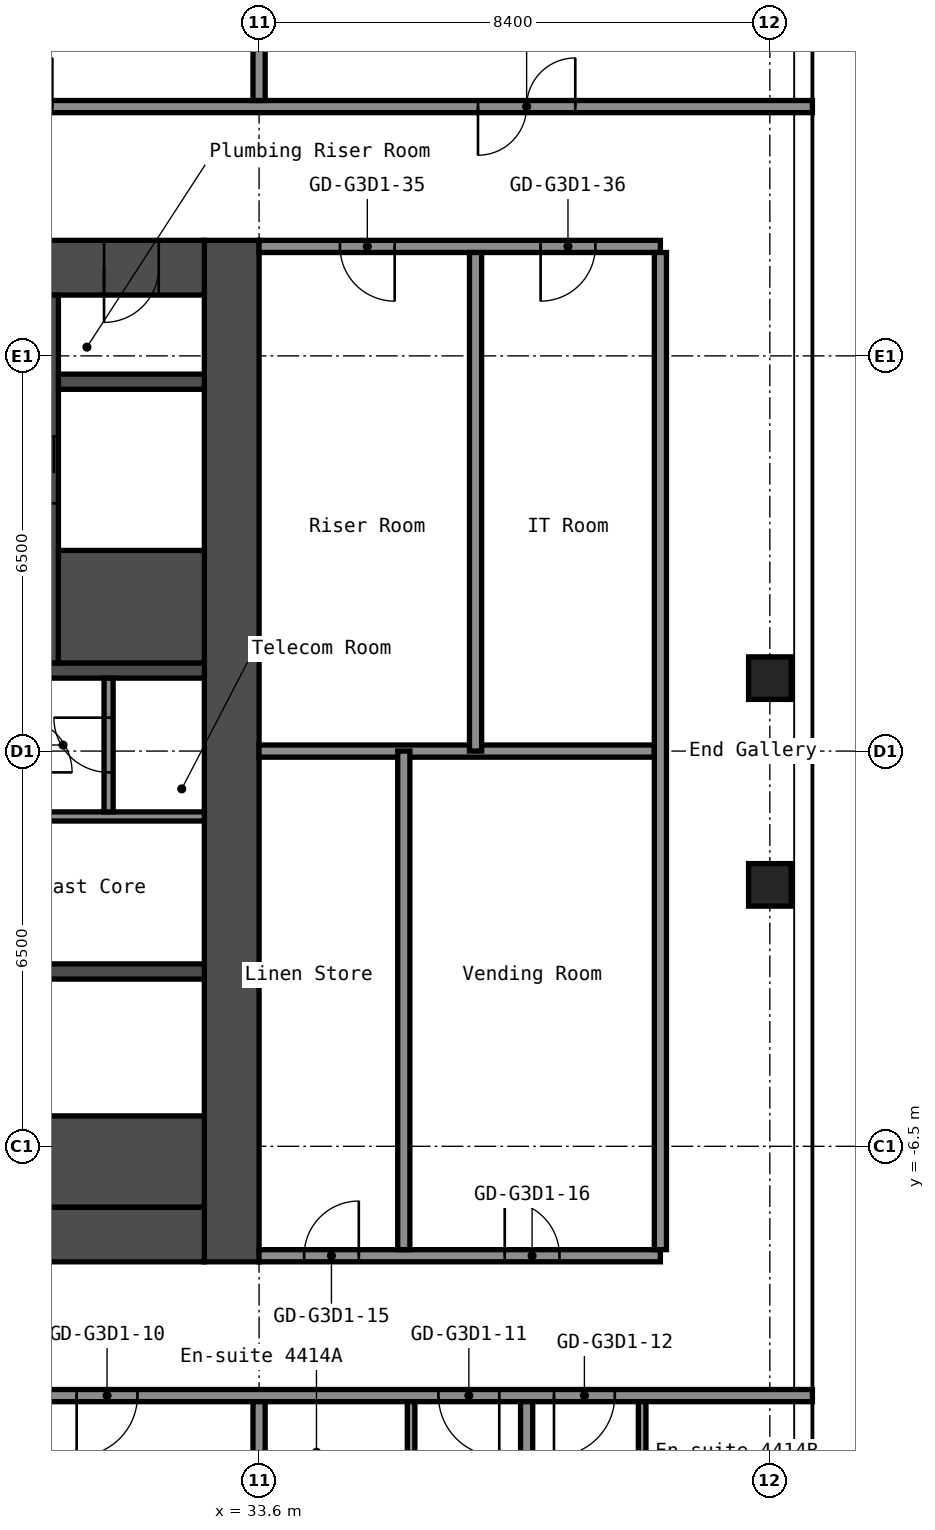
"""IFC4 building model, lengths in metres.
Left out: names, types, materials, properties, quantities, classifications, styles, units other than length and angle.
Written with IfcOpenShell. Run it as: python <this file> out.ifc"""

import sys

from ifc_helpers import new_model, si_unit, direction, frame, frame_2d, origin, origin_2d, place, context, subcontext, project, spatial, rectangle, hollow_rectangle, extrude, element, fill, save


model = new_model("IFC4")
c1 = context("Model", 3, precision=1e-05, world=origin(), true_north=direction((0.0, 1.0)))
c2 = subcontext(c1, "Body", "Model", "MODEL_VIEW")
j1 = project(units=[si_unit("LENGTHUNIT", "METRE"), si_unit("PLANEANGLEUNIT", "RADIAN")], contexts=[c1])
p1 = place(None, origin())
s1 = spatial("IfcSite", under=j1, at=p1, CompositionType="ELEMENT")
p2 = place(p1, origin())
s2 = spatial("IfcBuilding", under=s1, at=p2, CompositionType="ELEMENT")
p3 = place(p2, frame((0.0, 0.0, 156.6)))
s3 = spatial("IfcBuildingStorey", under=s2, at=p3, CompositionType="ELEMENT", Elevation=156.6)
for number, where, z_axis, x_axis in (
    (1, (42.0, -2.2, 0.0), (0.0, 0.0, 1.0), (1.0, 0.0, 0.0)),
    (2, (42.0, 1.2, 0.0), (0.0, 0.0, 1.0), (1.0, 0.0, 0.0)),
):
    element("IfcColumn", number, at=place(p3, frame(where, z_axis=z_axis, x_axis=x_axis)), inside=s3, PredefinedType="COLUMN", context=c2, shape_type="SweptSolid", body=[
        extrude(hollow_rectangle(XDim=0.7, YDim=0.7, WallThickness=0.028, at=origin_2d()), origin(), (0.0, 0.0, 1.0), 2.75),
    ])
p4 = place(p3, frame((33.15, -8.4, 0.0), z_axis=(0.0, 0.0, 1.0), x_axis=(0.0, 1.0, 0.0)))
e3 = element("IfcWall", 3, at=p4, inside=s3, PredefinedType="SHEAR", context=c2, shape_type="SweptSolid", body=[
    extrude(rectangle(XDim=16.8, YDim=0.9, at=frame_2d((8.4, 0.0))), origin(), (0.0, 0.0, 1.0), 2.75),
])
p5 = place(p3, frame((17.7, 7.95, 0.0), z_axis=(0.0, 0.0, 1.0), x_axis=(1.0, 0.0, 0.0)))
e4 = element("IfcWall", 4, at=p5, inside=s3, PredefinedType="SHEAR", context=c2, shape_type="SweptSolid", body=[
    extrude(rectangle(XDim=15.0, YDim=0.9, at=frame_2d((7.5, 0.0))), origin(), (0.0, 0.0, 1.0), 2.75),
])
p6 = place(p5, frame((10.4, 0.0, 0.0)))
e5 = element("IfcOpeningElement", 5, at=p6, cuts=e4, PredefinedType="OPENING", context=c2, shape_type="SweptSolid", body=[
    extrude(rectangle(XDim=1.2, YDim=2.1, at=frame_2d((0.6, 1.05))), frame((0.0, 0.46, 0.0), z_axis=(0.0, -1.0, 0.0), x_axis=(1.0, 0.0, 0.0)), (0.0, 0.0, 1.0), 0.92),
])
p7 = place(p5, frame((13.35, 0.0, 0.0)))
e6 = element("IfcOpeningElement", 6, at=p7, cuts=e4, PredefinedType="OPENING", context=c2, shape_type="SweptSolid", body=[
    extrude(rectangle(XDim=0.9, YDim=2.1, at=frame_2d((0.45, 1.05))), frame((0.0, 0.46, 0.0), z_axis=(0.0, -1.0, 0.0), x_axis=(1.0, 0.0, 0.0)), (0.0, 0.0, 1.0), 0.92),
])
p8 = place(p3, frame((17.7, -7.95, 0.0), z_axis=(0.0, 0.0, 1.0), x_axis=(1.0, 0.0, 0.0)))
e7 = element("IfcWall", 7, at=p8, inside=s3, PredefinedType="SHEAR", context=c2, shape_type="SweptSolid", body=[
    extrude(rectangle(XDim=15.0, YDim=0.9, at=frame_2d((7.5, 0.0))), origin(), (0.0, 0.0, 1.0), 2.75),
])
p9 = place(p8, frame((2.55, 0.0, 0.0)))
e8 = element("IfcOpeningElement", 8, at=p9, cuts=e7, PredefinedType="OPENING", context=c2, shape_type="SweptSolid", body=[
    extrude(rectangle(XDim=1.0, YDim=2.1, at=frame_2d((0.5, 1.05))), frame((0.0, 0.46, 0.0), z_axis=(0.0, -1.0, 0.0), x_axis=(1.0, 0.0, 0.0)), (0.0, 0.0, 1.0), 0.92),
])
p10 = place(p3, frame((27.65, 1.325, 0.0), z_axis=(0.0, 0.0, 1.0), x_axis=(1.0, 0.0, 0.0)))
e9 = element("IfcWall", 9, at=p10, inside=s3, PredefinedType="SHEAR", context=c2, shape_type="SweptSolid", body=[
    extrude(rectangle(XDim=5.05, YDim=0.25, at=frame_2d((2.525, 0.0))), origin(), (0.0, 0.0, 1.0), 2.75),
])
p11 = place(p10, frame((0.55, 0.0, 0.0)))
e10 = element("IfcOpeningElement", 10, at=p11, cuts=e9, PredefinedType="OPENING", context=c2, shape_type="SweptSolid", body=[
    extrude(rectangle(XDim=1.2, YDim=2.1, at=frame_2d((0.6, 1.05))), frame((0.0, 0.135, 0.0), z_axis=(0.0, -1.0, 0.0), x_axis=(1.0, 0.0, 0.0)), (0.0, 0.0, 1.0), 0.27),
])
p12 = place(p3, frame((30.175, 1.45, 0.0), z_axis=(0.0, 0.0, 1.0), x_axis=(0.0, 1.0, 0.0)))
e11 = element("IfcWall", 11, at=p12, inside=s3, PredefinedType="SHEAR", context=c2, shape_type="SweptSolid", body=[
    extrude(rectangle(XDim=6.05, YDim=0.25, at=frame_2d((3.025, 0.0))), origin(), (0.0, 0.0, 1.0), 2.75),
])
p13 = place(p12, frame((2.625, 0.0, 0.0)))
e12 = element("IfcOpeningElement", 12, at=p13, cuts=e11, PredefinedType="OPENING", context=c2, shape_type="SweptSolid", body=[
    extrude(rectangle(XDim=1.1, YDim=2.1, at=frame_2d((0.55, 1.05))), frame((0.0, 0.135, 0.0), z_axis=(0.0, -1.0, 0.0), x_axis=(1.0, 0.0, 0.0)), (0.0, 0.0, 1.0), 0.27),
])
p14 = place(p3, frame((30.3, 2.375, 0.0), z_axis=(0.0, 0.0, 1.0), x_axis=(1.0, 0.0, 0.0)))
e13 = element("IfcWall", 13, at=p14, inside=s3, PredefinedType="SHEAR", context=c2, shape_type="SweptSolid", body=[
    extrude(rectangle(XDim=2.4, YDim=1.85, at=frame_2d((1.2, 0.0))), origin(), (0.0, 0.0, 1.0), 2.75),
])
p15 = place(p3, frame((30.3, 6.075, 0.0), z_axis=(0.0, 0.0, 1.0), x_axis=(1.0, 0.0, 0.0)))
e14 = element("IfcWall", 14, at=p15, inside=s3, PredefinedType="SHEAR", context=c2, shape_type="SweptSolid", body=[
    extrude(rectangle(XDim=2.4, YDim=0.25, at=frame_2d((1.2, 0.0))), origin(), (0.0, 0.0, 1.0), 2.75),
])
p16 = place(p3, frame((28.15, -3.625, 0.0), z_axis=(0.0, 0.0, 1.0), x_axis=(1.0, 0.0, 0.0)))
e15 = element("IfcWall", 15, at=p16, inside=s3, PredefinedType="SHEAR", context=c2, shape_type="SweptSolid", body=[
    extrude(rectangle(XDim=4.55, YDim=0.25, at=frame_2d((2.275, 0.0))), origin(), (0.0, 0.0, 1.0), 2.75),
])
p17 = place(p3, frame((28.15, -6.75, 0.0), z_axis=(0.0, 0.0, 1.0), x_axis=(1.0, 0.0, 0.0)))
e16 = element("IfcWall", 16, at=p17, inside=s3, PredefinedType="SHEAR", context=c2, shape_type="SweptSolid", body=[
    extrude(rectangle(XDim=4.55, YDim=1.5, at=frame_2d((2.275, 0.0))), origin(), (0.0, 0.0, 1.0), 2.75),
])
p18 = place(p3, frame((29.7, -1.075, 0.0), z_axis=(0.0, 0.0, 1.0), x_axis=(1.0, 0.0, 0.0)))
e17 = element("IfcWall", 17, at=p18, inside=s3, PredefinedType="PARTITIONING", context=c2, shape_type="SweptSolid", body=[
    extrude(rectangle(XDim=3.0, YDim=0.15, at=frame_2d((1.5, 0.0))), origin(), (0.0, 0.0, 1.0), 2.75),
])
p19 = place(p3, frame((31.125, -1.0, 0.0), z_axis=(0.0, 0.0, 1.0), x_axis=(0.0, 1.0, 0.0)))
e18 = element("IfcWall", 18, at=p19, inside=s3, PredefinedType="PARTITIONING", context=c2, shape_type="SweptSolid", body=[
    extrude(rectangle(XDim=2.2, YDim=0.15, at=frame_2d((1.1, 0.0))), origin(), (0.0, 0.0, 1.0), 2.75),
])
p20 = place(p19, frame((0.65, 0.0, 0.0)))
e19 = element("IfcOpeningElement", 19, at=p20, cuts=e18, PredefinedType="OPENING", context=c2, shape_type="SweptSolid", body=[
    extrude(rectangle(XDim=0.9, YDim=2.1, at=frame_2d((0.45, 1.05))), frame((0.0, 0.085, 0.0), z_axis=(0.0, -1.0, 0.0), x_axis=(1.0, 0.0, 0.0)), (0.0, 0.0, 1.0), 0.17),
])
p21 = place(p3, frame((16.8, -10.6, 0.0), z_axis=(0.0, 0.0, 1.0), x_axis=(1.0, 0.0, 0.0)))
e20 = element("IfcWall", 20, at=p21, inside=s3, PredefinedType="PARTITIONING", context=c2, shape_type="SweptSolid", body=[
    extrude(rectangle(XDim=25.9, YDim=0.2, at=frame_2d((12.95, 0.0))), origin(), (0.0, 0.0, 1.0), 2.75),
])
p22 = place(p21, frame((2.85, 0.0, 0.0)))
e21 = element("IfcOpeningElement", 21, at=p22, cuts=e20, PredefinedType="OPENING", context=c2, shape_type="SweptSolid", body=[
    extrude(rectangle(XDim=1.0, YDim=2.1, at=frame_2d((0.5, 1.05))), frame((0.0, 0.11, 0.0), z_axis=(0.0, -1.0, 0.0), x_axis=(1.0, 0.0, 0.0)), (0.0, 0.0, 1.0), 0.22),
])
p23 = place(p21, frame((4.55, 0.0, 0.0)))
e22 = element("IfcOpeningElement", 22, at=p23, cuts=e20, PredefinedType="OPENING", context=c2, shape_type="SweptSolid", body=[
    extrude(rectangle(XDim=1.0, YDim=2.1, at=frame_2d((0.5, 1.05))), frame((0.0, 0.11, 0.0), z_axis=(0.0, -1.0, 0.0), x_axis=(1.0, 0.0, 0.0)), (0.0, 0.0, 1.0), 0.22),
])
p24 = place(p21, frame((13.8, 0.0, 0.0)))
e23 = element("IfcOpeningElement", 23, at=p24, cuts=e20, PredefinedType="OPENING", context=c2, shape_type="SweptSolid", body=[
    extrude(rectangle(XDim=1.0, YDim=2.1, at=frame_2d((0.5, 1.05))), frame((0.0, 0.11, 0.0), z_axis=(0.0, -1.0, 0.0), x_axis=(1.0, 0.0, 0.0)), (0.0, 0.0, 1.0), 0.22),
])
p25 = place(p21, frame((19.75, 0.0, 0.0)))
e24 = element("IfcOpeningElement", 24, at=p25, cuts=e20, PredefinedType="OPENING", context=c2, shape_type="SweptSolid", body=[
    extrude(rectangle(XDim=1.0, YDim=2.1, at=frame_2d((0.5, 1.05))), frame((0.0, 0.11, 0.0), z_axis=(0.0, -1.0, 0.0), x_axis=(1.0, 0.0, 0.0)), (0.0, 0.0, 1.0), 0.22),
])
p26 = place(p21, frame((21.65, 0.0, 0.0)))
e25 = element("IfcOpeningElement", 25, at=p26, cuts=e20, PredefinedType="OPENING", context=c2, shape_type="SweptSolid", body=[
    extrude(rectangle(XDim=1.0, YDim=2.1, at=frame_2d((0.5, 1.05))), frame((0.0, 0.11, 0.0), z_axis=(0.0, -1.0, 0.0), x_axis=(1.0, 0.0, 0.0)), (0.0, 0.0, 1.0), 0.22),
])
p27 = place(p3, frame((33.6, -8.3, 0.0), z_axis=(0.0, 0.0, 1.0), x_axis=(1.0, 0.0, 0.0)))
e26 = element("IfcWall", 26, at=p27, inside=s3, PredefinedType="PARTITIONING", context=c2, shape_type="SweptSolid", body=[
    extrude(rectangle(XDim=6.6, YDim=0.2, at=frame_2d((3.3, 0.0))), origin(), (0.0, 0.0, 1.0), 2.75),
])
p28 = place(p27, frame((0.74, 0.0, 0.0)))
e27 = element("IfcOpeningElement", 27, at=p28, cuts=e26, PredefinedType="OPENING", context=c2, shape_type="SweptSolid", body=[
    extrude(rectangle(XDim=0.9, YDim=2.1, at=frame_2d((0.45, 1.05))), frame((0.0, 0.11, 0.0), z_axis=(0.0, -1.0, 0.0), x_axis=(1.0, 0.0, 0.0)), (0.0, 0.0, 1.0), 0.22),
])
p29 = place(p27, frame((4.04, 0.0, 0.0)))
e28 = element("IfcOpeningElement", 28, at=p29, cuts=e26, PredefinedType="OPENING", context=c2, shape_type="SweptSolid", body=[
    extrude(rectangle(XDim=0.9, YDim=2.1, at=frame_2d((0.45, 1.05))), frame((0.0, 0.11, 0.0), z_axis=(0.0, -1.0, 0.0), x_axis=(1.0, 0.0, 0.0)), (0.0, 0.0, 1.0), 0.22),
])
p30 = place(p3, frame((33.6, 0.0, 0.0), z_axis=(0.0, 0.0, 1.0), x_axis=(1.0, 0.0, 0.0)))
e29 = element("IfcWall", 29, at=p30, inside=s3, PredefinedType="PARTITIONING", context=c2, shape_type="SweptSolid", body=[
    extrude(rectangle(XDim=6.5, YDim=0.2, at=frame_2d((3.25, 0.0))), origin(), (0.0, 0.0, 1.0), 2.75),
])
p31 = place(p3, frame((33.6, 8.3, 0.0), z_axis=(0.0, 0.0, 1.0), x_axis=(1.0, 0.0, 0.0)))
e30 = element("IfcWall", 30, at=p31, inside=s3, PredefinedType="PARTITIONING", context=c2, shape_type="SweptSolid", body=[
    extrude(rectangle(XDim=6.6, YDim=0.2, at=frame_2d((3.3, 0.0))), origin(), (0.0, 0.0, 1.0), 2.75),
])
p32 = place(p31, frame((1.33, 0.0, 0.0)))
e31 = element("IfcOpeningElement", 31, at=p32, cuts=e30, PredefinedType="OPENING", context=c2, shape_type="SweptSolid", body=[
    extrude(rectangle(XDim=0.9, YDim=2.1, at=frame_2d((0.45, 1.05))), frame((0.0, 0.11, 0.0), z_axis=(0.0, -1.0, 0.0), x_axis=(1.0, 0.0, 0.0)), (0.0, 0.0, 1.0), 0.22),
])
p33 = place(p31, frame((4.63, 0.0, 0.0)))
e32 = element("IfcOpeningElement", 32, at=p33, cuts=e30, PredefinedType="OPENING", context=c2, shape_type="SweptSolid", body=[
    extrude(rectangle(XDim=0.9, YDim=2.1, at=frame_2d((0.45, 1.05))), frame((0.0, 0.11, 0.0), z_axis=(0.0, -1.0, 0.0), x_axis=(1.0, 0.0, 0.0)), (0.0, 0.0, 1.0), 0.22),
])
p34 = place(p3, frame((16.8, 10.6, 0.0), z_axis=(0.0, 0.0, 1.0), x_axis=(1.0, 0.0, 0.0)))
e33 = element("IfcWall", 33, at=p34, inside=s3, PredefinedType="PARTITIONING", context=c2, shape_type="SweptSolid", body=[
    extrude(rectangle(XDim=25.9, YDim=0.2, at=frame_2d((12.95, 0.0))), origin(), (0.0, 0.0, 1.0), 2.75),
])
p35 = place(p34, frame((3.4, 0.0, 0.0)))
e34 = element("IfcOpeningElement", 34, at=p35, cuts=e33, PredefinedType="OPENING", context=c2, shape_type="SweptSolid", body=[
    extrude(rectangle(XDim=1.6, YDim=2.1, at=frame_2d((0.8, 1.05))), frame((0.0, 0.11, 0.0), z_axis=(0.0, -1.0, 0.0), x_axis=(1.0, 0.0, 0.0)), (0.0, 0.0, 1.0), 0.22),
])
p36 = place(p34, frame((11.8, 0.0, 0.0)))
e35 = element("IfcOpeningElement", 35, at=p36, cuts=e33, PredefinedType="OPENING", context=c2, shape_type="SweptSolid", body=[
    extrude(rectangle(XDim=1.6, YDim=2.1, at=frame_2d((0.8, 1.05))), frame((0.0, 0.11, 0.0), z_axis=(0.0, -1.0, 0.0), x_axis=(1.0, 0.0, 0.0)), (0.0, 0.0, 1.0), 0.22),
])
p37 = place(p34, frame((20.4, 0.0, 0.0)))
e36 = element("IfcOpeningElement", 36, at=p37, cuts=e33, PredefinedType="OPENING", context=c2, shape_type="SweptSolid", body=[
    extrude(rectangle(XDim=1.6, YDim=2.1, at=frame_2d((0.8, 1.05))), frame((0.0, 0.11, 0.0), z_axis=(0.0, -1.0, 0.0), x_axis=(1.0, 0.0, 0.0)), (0.0, 0.0, 1.0), 0.22),
])
p38 = place(p3, frame((33.6, -19.3, 0.0), z_axis=(0.0, 0.0, 1.0), x_axis=(0.0, 1.0, 0.0)))
e37 = element("IfcWall", 37, at=p38, inside=s3, PredefinedType="PARTITIONING", context=c2, shape_type="SweptSolid", body=[
    extrude(rectangle(XDim=8.6, YDim=0.2, at=frame_2d((4.3, 0.0))), origin(), (0.0, 0.0, 1.0), 2.75),
])
p39 = place(p3, frame((33.6, 10.7, 0.0), z_axis=(0.0, 0.0, 1.0), x_axis=(0.0, 1.0, 0.0)))
e38 = element("IfcWall", 38, at=p39, inside=s3, PredefinedType="PARTITIONING", context=c2, shape_type="SweptSolid", body=[
    extrude(rectangle(XDim=7.6, YDim=0.2, at=frame_2d((3.8, 0.0))), origin(), (0.0, 0.0, 1.0), 2.75),
])
p40 = place(p3, frame((35.98, -8.2, 0.0), z_axis=(0.0, 0.0, 1.0), x_axis=(0.0, 1.0, 0.0)))
e39 = element("IfcWall", 39, at=p40, inside=s3, PredefinedType="PARTITIONING", context=c2, shape_type="SweptSolid", body=[
    extrude(rectangle(XDim=8.2, YDim=0.2, at=frame_2d((4.1, 0.0))), origin(), (0.0, 0.0, 1.0), 2.75),
])
p41 = place(p3, frame((36.1, -13.6, 0.0), z_axis=(0.0, 0.0, 1.0), x_axis=(0.0, 1.0, 0.0)))
e40 = element("IfcWall", 40, at=p41, inside=s3, PredefinedType="PARTITIONING", context=c2, shape_type="SweptSolid", body=[
    extrude(rectangle(XDim=2.9, YDim=0.125, at=frame_2d((1.45, 0.0))), origin(), (0.0, 0.0, 1.0), 2.75),
])
p42 = place(p41, frame((0.6, 0.0, 0.0)))
e41 = element("IfcOpeningElement", 41, at=p42, cuts=e40, PredefinedType="OPENING", context=c2, shape_type="SweptSolid", body=[
    extrude(rectangle(XDim=0.8, YDim=2.1, at=frame_2d((0.4, 1.05))), frame((0.0, 0.073, 0.0), z_axis=(0.0, -1.0, 0.0), x_axis=(1.0, 0.0, 0.0)), (0.0, 0.0, 1.0), 0.145),
])
p43 = place(p3, frame((37.16, 0.0, 0.0), z_axis=(0.0, 0.0, 1.0), x_axis=(0.0, 1.0, 0.0)))
e42 = element("IfcWall", 42, at=p43, inside=s3, PredefinedType="PARTITIONING", context=c2, shape_type="SweptSolid", body=[
    extrude(rectangle(XDim=8.2, YDim=0.2, at=frame_2d((4.1, 0.0))), origin(), (0.0, 0.0, 1.0), 2.75),
])
p44 = place(p3, frame((38.0, -19.3, 0.0), z_axis=(0.0, 0.0, 1.0), x_axis=(0.0, 1.0, 0.0)))
e43 = element("IfcWall", 43, at=p44, inside=s3, PredefinedType="PARTITIONING", context=c2, shape_type="SweptSolid", body=[
    extrude(rectangle(XDim=8.6, YDim=0.2, at=frame_2d((4.3, 0.0))), origin(), (0.0, 0.0, 1.0), 2.75),
])
p45 = place(p3, frame((39.9, -13.6, 0.0), z_axis=(0.0, 0.0, 1.0), x_axis=(0.0, 1.0, 0.0)))
e44 = element("IfcWall", 44, at=p45, inside=s3, PredefinedType="PARTITIONING", context=c2, shape_type="SweptSolid", body=[
    extrude(rectangle(XDim=2.9, YDim=0.125, at=frame_2d((1.45, 0.0))), origin(), (0.0, 0.0, 1.0), 2.75),
])
p46 = place(p45, frame((0.6, 0.0, 0.0)))
e45 = element("IfcOpeningElement", 45, at=p46, cuts=e44, PredefinedType="OPENING", context=c2, shape_type="SweptSolid", body=[
    extrude(rectangle(XDim=0.8, YDim=2.1, at=frame_2d((0.4, 1.05))), frame((0.0, 0.073, 0.0), z_axis=(0.0, -1.0, 0.0), x_axis=(1.0, 0.0, 0.0)), (0.0, 0.0, 1.0), 0.145),
])
p47 = place(p3, frame((40.2, -8.2, 0.0), z_axis=(0.0, 0.0, 1.0), x_axis=(0.0, 1.0, 0.0)))
e46 = element("IfcWall", 46, at=p47, inside=s3, PredefinedType="PARTITIONING", context=c2, shape_type="SweptSolid", body=[
    extrude(rectangle(XDim=16.4, YDim=0.2, at=frame_2d((8.2, 0.0))), origin(), (0.0, 0.0, 1.0), 2.75),
])
p48 = place(p7, origin())
e47 = element("IfcDoor", 47, at=p48, inside=s3, OperationType="SINGLE_SWING_LEFT", PredefinedType="DOOR", context=c2, shape_type="SweptSolid", body=[
    extrude(rectangle(XDim=0.9, YDim=2.1, at=frame_2d((0.45, 1.05))), frame((0.0, 0.025, 0.0), z_axis=(0.0, -1.0, 0.0), x_axis=(1.0, 0.0, 0.0)), (0.0, 0.0, 1.0), 0.05),
])
fill(e6, e47)
p49 = place(p20, origin())
e48 = element("IfcDoor", 48, at=p49, inside=s3, OperationType="SINGLE_SWING_LEFT", PredefinedType="DOOR", context=c2, shape_type="SweptSolid", body=[
    extrude(rectangle(XDim=0.9, YDim=2.1, at=frame_2d((0.45, 1.05))), frame((0.0, 0.025, 0.0), z_axis=(0.0, -1.0, 0.0), x_axis=(1.0, 0.0, 0.0)), (0.0, 0.0, 1.0), 0.05),
])
fill(e19, e48)
p50 = place(p13, origin())
e49 = element("IfcDoor", 49, at=p50, inside=s3, OperationType="DOUBLE_DOOR_SLIDING", PredefinedType="DOOR", context=c2, shape_type="SweptSolid", body=[
    extrude(rectangle(XDim=1.1, YDim=2.1, at=frame_2d((0.55, 1.05))), frame((0.0, 0.025, 0.0), z_axis=(0.0, -1.0, 0.0), x_axis=(1.0, 0.0, 0.0)), (0.0, 0.0, 1.0), 0.05),
])
fill(e12, e49)
p51 = place(p24, origin())
e50 = element("IfcDoor", 50, at=p51, inside=s3, OperationType="SINGLE_SWING_LEFT", PredefinedType="DOOR", context=c2, shape_type="SweptSolid", body=[
    extrude(rectangle(XDim=1.0, YDim=2.1, at=frame_2d((0.5, 1.05))), frame((0.0, 0.025, 0.0), z_axis=(0.0, -1.0, 0.0), x_axis=(1.0, 0.0, 0.0)), (0.0, 0.0, 1.0), 0.05),
])
fill(e23, e50)
p52 = place(p25, origin())
e51 = element("IfcDoor", 51, at=p52, inside=s3, OperationType="SINGLE_SWING_RIGHT", PredefinedType="DOOR", context=c2, shape_type="SweptSolid", body=[
    extrude(rectangle(XDim=1.0, YDim=2.1, at=frame_2d((0.5, 1.05))), frame((0.0, 0.025, 0.0), z_axis=(0.0, -1.0, 0.0), x_axis=(1.0, 0.0, 0.0)), (0.0, 0.0, 1.0), 0.05),
])
fill(e24, e51)
p53 = place(p26, origin())
e52 = element("IfcDoor", 52, at=p53, inside=s3, OperationType="SINGLE_SWING_LEFT", PredefinedType="DOOR", context=c2, shape_type="SweptSolid", body=[
    extrude(rectangle(XDim=1.0, YDim=2.1, at=frame_2d((0.5, 1.05))), frame((0.0, 0.025, 0.0), z_axis=(0.0, -1.0, 0.0), x_axis=(1.0, 0.0, 0.0)), (0.0, 0.0, 1.0), 0.05),
])
fill(e25, e52)
p54 = place(p28, origin())
e53 = element("IfcDoor", 53, at=p54, inside=s3, OperationType="SINGLE_SWING_LEFT", PredefinedType="DOOR", context=c2, shape_type="SweptSolid", body=[
    extrude(rectangle(XDim=0.9, YDim=2.1, at=frame_2d((0.45, 1.05))), frame((0.0, 0.025, 0.0), z_axis=(0.0, -1.0, 0.0), x_axis=(1.0, 0.0, 0.0)), (0.0, 0.0, 1.0), 0.05),
])
fill(e27, e53)
p55 = place(p29, origin())
e54 = element("IfcDoor", 54, at=p55, inside=s3, OperationType="SINGLE_SWING_RIGHT", PredefinedType="DOOR", context=c2, shape_type="SweptSolid", body=[
    extrude(rectangle(XDim=0.9, YDim=2.1, at=frame_2d((0.45, 1.05))), frame((0.0, 0.025, 0.0), z_axis=(0.0, -1.0, 0.0), x_axis=(1.0, 0.0, 0.0)), (0.0, 0.0, 1.0), 0.05),
])
fill(e28, e54)
p56 = place(p32, origin())
e55 = element("IfcDoor", 55, at=p56, inside=s3, OperationType="SINGLE_SWING_RIGHT", PredefinedType="DOOR", context=c2, shape_type="SweptSolid", body=[
    extrude(rectangle(XDim=0.9, YDim=2.1, at=frame_2d((0.45, 1.05))), frame((0.0, 0.025, 0.0), z_axis=(0.0, -1.0, 0.0), x_axis=(1.0, 0.0, 0.0)), (0.0, 0.0, 1.0), 0.05),
])
fill(e31, e55)
p57 = place(p33, origin())
e56 = element("IfcDoor", 56, at=p57, inside=s3, OperationType="SINGLE_SWING_LEFT", PredefinedType="DOOR", context=c2, shape_type="SweptSolid", body=[
    extrude(rectangle(XDim=0.9, YDim=2.1, at=frame_2d((0.45, 1.05))), frame((0.0, 0.025, 0.0), z_axis=(0.0, -1.0, 0.0), x_axis=(1.0, 0.0, 0.0)), (0.0, 0.0, 1.0), 0.05),
])
fill(e32, e56)
p58 = place(p36, origin())
e57 = element("IfcDoor", 57, at=p58, inside=s3, OperationType="DOUBLE_DOOR_SINGLE_SWING", PredefinedType="DOOR", context=c2, shape_type="SweptSolid", body=[
    extrude(rectangle(XDim=1.6, YDim=2.1, at=frame_2d((0.8, 1.05))), frame((0.0, 0.025, 0.0), z_axis=(0.0, -1.0, 0.0), x_axis=(1.0, 0.0, 0.0)), (0.0, 0.0, 1.0), 0.05),
])
fill(e35, e57)
p59 = place(p37, origin())
e58 = element("IfcDoor", 58, at=p59, inside=s3, OperationType="DOUBLE_DOOR_SINGLE_SWING", PredefinedType="DOOR", context=c2, shape_type="SweptSolid", body=[
    extrude(rectangle(XDim=1.6, YDim=2.1, at=frame_2d((0.8, 1.05))), frame((0.0, 0.025, 0.0), z_axis=(0.0, -1.0, 0.0), x_axis=(1.0, 0.0, 0.0)), (0.0, 0.0, 1.0), 0.05),
])
fill(e36, e58)
save(model, sys.argv[1])
